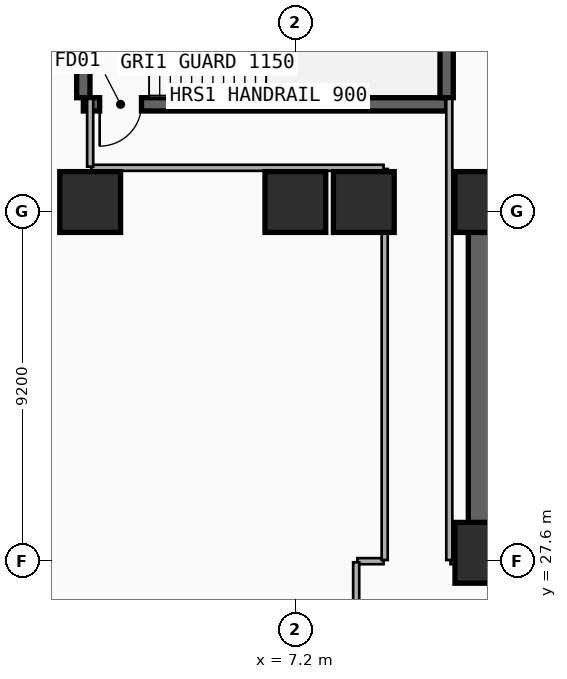
"""IFC4 building model, lengths in metres.
Left out: names, types, materials, properties, quantities, classifications, styles, units other than length and angle.
Written with IfcOpenShell. Run it as: python <this file> out.ifc"""

import sys

from ifc_helpers import new_model, si_unit, direction, frame, frame_2d, origin, origin_2d, place, context, subcontext, project, spatial, rectangle, extrude, element, fill, save


model = new_model("IFC4")
c1 = context("Model", 3, precision=1e-05, world=origin(), true_north=direction((0.0, 1.0)))
c2 = subcontext(c1, "Body", "Model", "MODEL_VIEW")
j1 = project(units=[si_unit("LENGTHUNIT", "METRE"), si_unit("PLANEANGLEUNIT", "RADIAN")], contexts=[c1])
p1 = place(None, origin())
s1 = spatial("IfcSite", under=j1, at=p1, CompositionType="ELEMENT")
p2 = place(p1, origin())
s2 = spatial("IfcBuilding", under=s1, at=p2, CompositionType="ELEMENT")
p3 = place(p2, frame((0.0, 0.0, -4.4)))
s3 = spatial("IfcBuildingStorey", under=s2, at=p3, CompositionType="ELEMENT", Elevation=-4.4)
p4 = place(p3, frame((12.15, 37.05, 0.0), z_axis=(0.0, 0.0, 1.0), x_axis=(1.0, 0.0, 0.0)))
e1 = element("IfcWall", 1, at=p4, inside=s3, PredefinedType="SHEAR", context=c2, shape_type="SweptSolid", body=[
    extrude(rectangle(XDim=33.23, YDim=0.8, at=frame_2d((16.615, 0.0))), origin(), (0.0, 0.0, 1.0), 4.4),
])
p5 = place(p3, frame((21.18, 27.82, 0.0), z_axis=(0.0, 0.0, 1.0), x_axis=(-1.0, 0.0, 0.0)))
e2 = element("IfcWall", 2, at=p5, inside=s3, PredefinedType="SHEAR", context=c2, shape_type="SweptSolid", body=[
    extrude(rectangle(XDim=9.03, YDim=0.8, at=frame_2d((4.515, 0.0))), origin(), (0.0, 0.0, 1.0), 4.4),
])
p6 = place(p5, frame((2.68, 0.0, 0.0)))
e3 = element("IfcOpeningElement", 3, at=p6, cuts=e2, PredefinedType="OPENING", context=c2, shape_type="SweptSolid", body=[
    extrude(rectangle(XDim=1.1, YDim=2.15, at=frame_2d((0.55, 1.075))), frame((0.0, 0.41, 0.0), z_axis=(0.0, -1.0, 0.0), x_axis=(1.0, 0.0, 0.0)), (0.0, 0.0, 1.0), 0.82),
])
p7 = place(p3, frame((12.15, 28.22, 0.0), z_axis=(0.0, 0.0, 1.0), x_axis=(0.0, 1.0, 0.0)))
e4 = element("IfcWall", 4, at=p7, inside=s3, PredefinedType="SHEAR", context=c2, shape_type="SweptSolid", body=[
    extrude(rectangle(XDim=8.43, YDim=0.8, at=frame_2d((4.215, 0.0))), origin(), (0.0, 0.0, 1.0), 4.4),
])
p8 = place(p3, frame((11.18, 39.62, 0.0), z_axis=(0.0, 0.0, 1.0), x_axis=(-1.0, 0.0, 0.0)))
e5 = element("IfcWall", 5, at=p8, inside=s3, PredefinedType="SHEAR", context=c2, shape_type="SweptSolid", body=[
    extrude(rectangle(XDim=9.56, YDim=0.35, at=frame_2d((4.78, 0.0))), origin(), (0.0, 0.0, 1.0), 4.4),
])
p9 = place(p8, frame((8.03, 0.0, 0.0)))
e6 = element("IfcOpeningElement", 6, at=p9, cuts=e5, PredefinedType="OPENING", context=c2, shape_type="SweptSolid", body=[
    extrude(rectangle(XDim=1.1, YDim=2.15, at=frame_2d((0.55, 1.075))), frame((0.0, 0.185, 0.0), z_axis=(0.0, -1.0, 0.0), x_axis=(1.0, 0.0, 0.0)), (0.0, 0.0, 1.0), 0.37),
])
for number, where, z_axis, x_axis in (
    (7, (1.62, 39.795, 0.0), (0.0, 0.0, 1.0), (0.0, 1.0, 0.0)),
    (8, (11.18, 39.795, 0.0), (0.0, 0.0, 1.0), (0.0, 1.0, 0.0)),
):
    element("IfcWall", number, at=place(p3, frame(where, z_axis=z_axis, x_axis=x_axis)), inside=s3, PredefinedType="SHEAR", context=c2, shape_type="SweptSolid", body=[
        extrude(rectangle(XDim=3.27, YDim=0.35, at=frame_2d((1.635, 0.0))), origin(), (0.0, 0.0, 1.0), 4.4),
    ])
for number, where, z_axis, x_axis in (
    (9, (12.2, 27.82, 0.0), (0.0, 0.0, 1.0), (1.0, 0.0, 0.0)),
    (10, (12.2, 37.05, 0.0), (0.0, 0.0, 1.0), (1.0, 0.0, 0.0)),
    (11, (1.8, 37.05, 0.0), (0.0, 0.0, 1.0), (1.0, 0.0, 0.0)),
    (12, (7.2, 37.05, 0.0), (0.0, 0.0, 1.0), (1.0, 0.0, 0.0)),
    (13, (9.0, 37.05, 0.0), (0.0, 0.0, 1.0), (1.0, 0.0, 0.0)),
):
    element("IfcColumn", number, at=place(p3, frame(where, z_axis=z_axis, x_axis=x_axis)), inside=s3, PredefinedType="COLUMN", context=c2, shape_type="SweptSolid", body=[
        extrude(rectangle(XDim=1.6, YDim=1.6, at=origin_2d()), origin(), (0.0, 0.0, 1.0), 4.4),
    ])
p10 = place(p3, frame((8.83, 27.6, 0.0), z_axis=(0.0, 0.0, 1.0), x_axis=(1.0, 0.0, 0.0)))
e14 = element("IfcWall", 14, at=p10, inside=s3, PredefinedType="PARTITIONING", context=c2, shape_type="SweptSolid", body=[
    extrude(rectangle(XDim=0.69, YDim=0.16, at=frame_2d((0.345, 0.0))), origin(), (0.0, 0.0, 1.0), 4.05),
])
p11 = place(p3, frame((11.28, 27.6, 0.0), z_axis=(0.0, 0.0, 1.0), x_axis=(1.0, 0.0, 0.0)))
e15 = element("IfcWall", 15, at=p11, inside=s3, PredefinedType="PARTITIONING", context=c2, shape_type="SweptSolid", body=[
    extrude(rectangle(XDim=0.84, YDim=0.16, at=frame_2d((0.42, 0.0))), origin(), (0.0, 0.0, 1.0), 3.022),
])
p12 = place(p3, frame((8.8, 25.48, 0.0), z_axis=(0.0, 0.0, 1.0), x_axis=(0.0, 1.0, 0.0)))
e16 = element("IfcWall", 16, at=p12, inside=s3, PredefinedType="PARTITIONING", context=c2, shape_type="SweptSolid", body=[
    extrude(rectangle(XDim=2.09, YDim=0.16, at=frame_2d((1.045, 0.0))), origin(), (0.0, 0.0, 1.0), 4.05),
])
p13 = place(p3, frame((9.55, 27.63, 0.0), z_axis=(0.0, 0.0, 1.0), x_axis=(0.0, 1.0, 0.0)))
e17 = element("IfcWall", 17, at=p13, inside=s3, PredefinedType="PARTITIONING", context=c2, shape_type="SweptSolid", body=[
    extrude(rectangle(XDim=10.29, YDim=0.16, at=frame_2d((5.145, 0.0))), origin(), (0.0, 0.0, 1.0), 4.05),
])
p14 = place(p3, frame((11.25, 27.63, 0.0), z_axis=(0.0, 0.0, 1.0), x_axis=(0.0, 1.0, 0.0)))
e18 = element("IfcWall", 18, at=p14, inside=s3, PredefinedType="PARTITIONING", context=c2, shape_type="SweptSolid", body=[
    extrude(rectangle(XDim=12.135, YDim=0.16, at=frame_2d((6.067, 0.0))), origin(), (0.0, 0.0, 1.0), 4.05),
])
p15 = place(p3, frame((1.83, 37.95, 0.0), z_axis=(0.0, 0.0, 1.0), x_axis=(1.0, 0.0, 0.0)))
e19 = element("IfcWall", 19, at=p15, inside=s3, PredefinedType="PARTITIONING", context=c2, shape_type="SweptSolid", body=[
    extrude(rectangle(XDim=7.69, YDim=0.16, at=frame_2d((3.845, 0.0))), origin(), (0.0, 0.0, 1.0), 4.05),
])
p16 = place(p3, frame((1.8, 37.98, 0.0), z_axis=(0.0, 0.0, 1.0), x_axis=(0.0, 1.0, 0.0)))
e20 = element("IfcWall", 20, at=p16, inside=s3, PredefinedType="PARTITIONING", context=c2, shape_type="SweptSolid", body=[
    extrude(rectangle(XDim=1.785, YDim=0.16, at=frame_2d((0.893, 0.0))), origin(), (0.0, 0.0, 1.0), 4.05),
])
p17 = place(p9, origin())
e21 = element("IfcDoor", 21, at=p17, inside=s3, OperationType="SINGLE_SWING_RIGHT", PredefinedType="DOOR", context=c2, shape_type="SweptSolid", body=[
    extrude(rectangle(XDim=1.1, YDim=2.15, at=frame_2d((0.55, 1.075))), frame((0.0, 0.025, 0.0), z_axis=(0.0, -1.0, 0.0), x_axis=(1.0, 0.0, 0.0)), (0.0, 0.0, 1.0), 0.05),
])
fill(e6, e21)
save(model, sys.argv[1])
